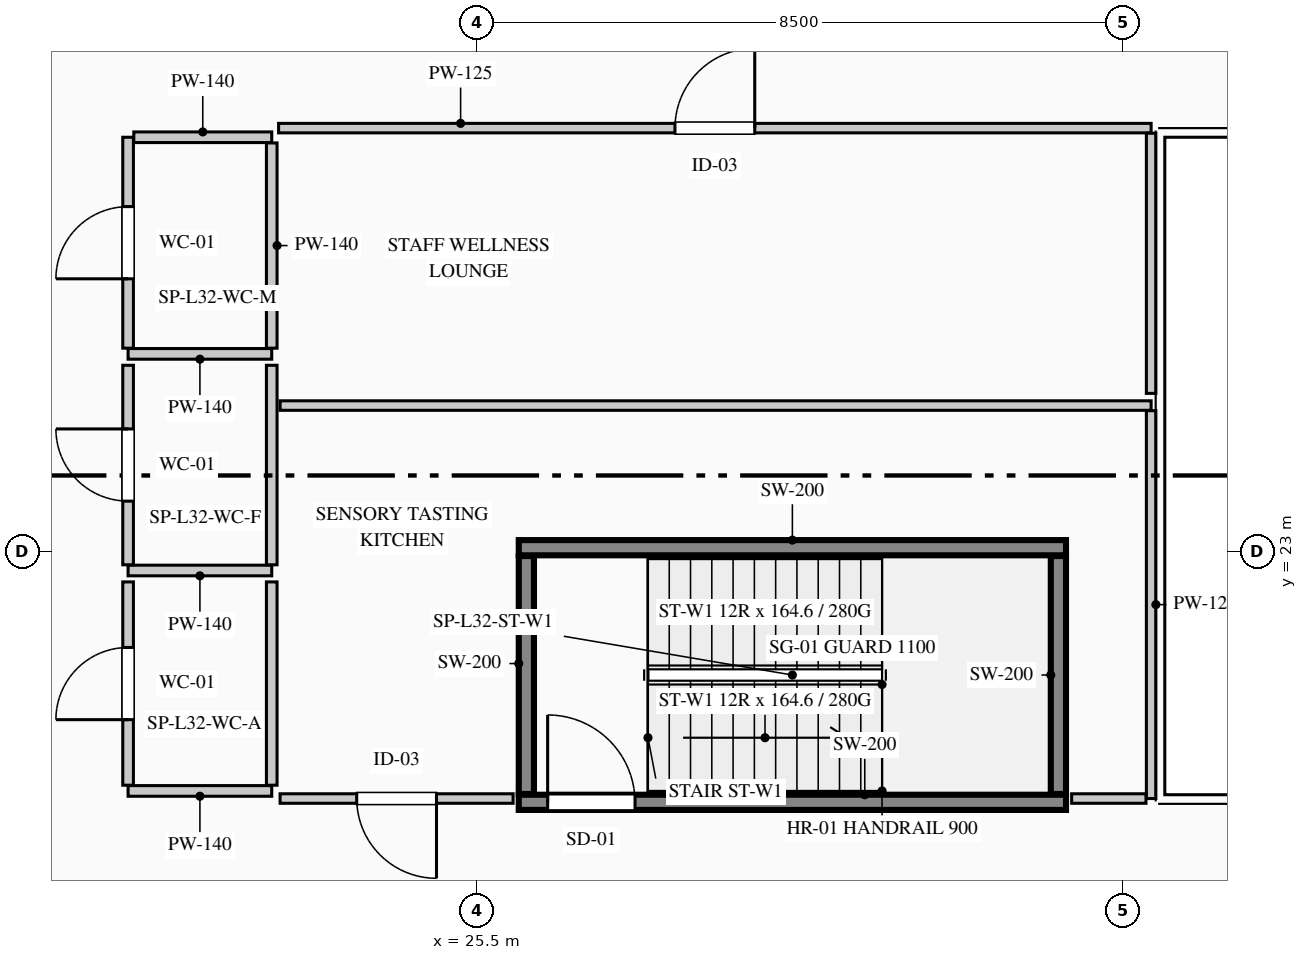
"""IFC4 building model, lengths in metres.
Left out: names, types, materials, properties, quantities, classifications, styles, units other than length and angle.
Written with IfcOpenShell. Run it as: python <this file> out.ifc"""

import sys

from ifc_helpers import new_model, si_unit, direction, frame, frame_2d, origin, place, context, subcontext, project, spatial, rectangle, extrude, element, fill, save


model = new_model("IFC4")
c1 = context("Model", 3, precision=1e-05, world=origin(), true_north=direction((0.0, 1.0)))
c2 = subcontext(c1, "Body", "Model", "MODEL_VIEW")
j1 = project(units=[si_unit("LENGTHUNIT", "METRE"), si_unit("PLANEANGLEUNIT", "RADIAN")], contexts=[c1])
p1 = place(None, origin())
s1 = spatial("IfcSite", under=j1, at=p1, CompositionType="ELEMENT")
p2 = place(p1, origin())
s2 = spatial("IfcBuilding", under=s1, at=p2, CompositionType="ELEMENT")
p3 = place(p2, frame((0.0, 0.0, 139.05)))
s3 = spatial("IfcBuildingStorey", under=s2, at=p3, CompositionType="ELEMENT", Elevation=139.05)
p4 = place(p3, frame((26.05, 19.7, 0.0), z_axis=(0.0, 0.0, 1.0), x_axis=(1.0, 0.0, 0.0)))
e1 = element("IfcWall", 1, at=p4, inside=s3, PredefinedType="SHEAR", context=c2, shape_type="SweptSolid", body=[
    extrude(rectangle(XDim=7.2, YDim=0.2, at=frame_2d((3.6, 0.0))), origin(), (0.0, 0.0, 1.0), 3.95),
])
p5 = place(p4, frame((0.38, 0.0, 0.0)))
e2 = element("IfcOpeningElement", 2, at=p5, cuts=e1, PredefinedType="OPENING", context=c2, shape_type="SweptSolid", body=[
    extrude(rectangle(XDim=1.15, YDim=2.2, at=frame_2d((0.575, 1.1))), frame((0.0, 0.11, 0.0), z_axis=(0.0, -1.0, 0.0), x_axis=(1.0, 0.0, 0.0)), (0.0, 0.0, 1.0), 0.22),
])
p6 = place(p3, frame((26.05, 23.05, 0.0), z_axis=(0.0, 0.0, 1.0), x_axis=(1.0, 0.0, 0.0)))
e3 = element("IfcWall", 3, at=p6, inside=s3, PredefinedType="SHEAR", context=c2, shape_type="SweptSolid", body=[
    extrude(rectangle(XDim=7.2, YDim=0.2, at=frame_2d((3.6, 0.0))), origin(), (0.0, 0.0, 1.0), 3.95),
])
for number, where, z_axis, x_axis in (
    (4, (26.15, 19.81, 0.0), (0.0, 0.0, 1.0), (0.0, 1.0, 0.0)),
    (5, (33.15, 19.81, 0.0), (0.0, 0.0, 1.0), (0.0, 1.0, 0.0)),
):
    element("IfcWall", number, at=place(p3, frame(where, z_axis=z_axis, x_axis=x_axis)), inside=s3, PredefinedType="SHEAR", context=c2, shape_type="SweptSolid", body=[
        extrude(rectangle(XDim=3.13, YDim=0.2, at=frame_2d((1.565, 0.0))), origin(), (0.0, 0.0, 1.0), 3.95),
    ])
p7 = place(p3, frame((22.8, 25.6, 0.0), z_axis=(0.0, 0.0, 1.0), x_axis=(-1.0, 0.0, 0.0)))
e6 = element("IfcWall", 6, at=p7, inside=s3, PredefinedType="PARTITIONING", context=c2, shape_type="SweptSolid", body=[
    extrude(rectangle(XDim=1.89, YDim=0.14, at=frame_2d((0.945, 0.0))), origin(), (0.0, 0.0, 1.0), 3.69),
])
p8 = place(p3, frame((20.91, 25.675, 0.0), z_axis=(0.0, 0.0, 1.0), x_axis=(0.0, 1.0, 0.0)))
e7 = element("IfcWall", 7, at=p8, inside=s3, PredefinedType="PARTITIONING", context=c2, shape_type="SweptSolid", body=[
    extrude(rectangle(XDim=2.775, YDim=0.14, at=frame_2d((1.387, 0.0))), origin(), (0.0, 0.0, 1.0), 3.69),
])
p9 = place(p8, frame((0.913, 0.0, 0.0)))
e8 = element("IfcOpeningElement", 8, at=p9, cuts=e7, PredefinedType="OPENING", context=c2, shape_type="SweptSolid", body=[
    extrude(rectangle(XDim=0.95, YDim=2.15, at=frame_2d((0.475, 1.075))), frame((0.0, 0.08, 0.0), z_axis=(0.0, -1.0, 0.0), x_axis=(1.0, 0.0, 0.0)), (0.0, 0.0, 1.0), 0.16),
])
p10 = place(p3, frame((20.985, 28.45, 0.0), z_axis=(0.0, 0.0, 1.0), x_axis=(1.0, 0.0, 0.0)))
e9 = element("IfcWall", 9, at=p10, inside=s3, PredefinedType="PARTITIONING", context=c2, shape_type="SweptSolid", body=[
    extrude(rectangle(XDim=1.815, YDim=0.14, at=frame_2d((0.907, 0.0))), origin(), (0.0, 0.0, 1.0), 3.69),
])
p11 = place(p3, frame((22.8, 28.375, 0.0), z_axis=(0.0, 0.0, 1.0), x_axis=(0.0, -1.0, 0.0)))
e10 = element("IfcWall", 10, at=p11, inside=s3, PredefinedType="PARTITIONING", context=c2, shape_type="SweptSolid", body=[
    extrude(rectangle(XDim=2.7, YDim=0.14, at=frame_2d((1.35, 0.0))), origin(), (0.0, 0.0, 1.0), 3.275),
])
p12 = place(p3, frame((22.8, 22.75, 0.0), z_axis=(0.0, 0.0, 1.0), x_axis=(-1.0, 0.0, 0.0)))
e11 = element("IfcWall", 11, at=p12, inside=s3, PredefinedType="PARTITIONING", context=c2, shape_type="SweptSolid", body=[
    extrude(rectangle(XDim=1.89, YDim=0.14, at=frame_2d((0.945, 0.0))), origin(), (0.0, 0.0, 1.0), 3.69),
])
p13 = place(p3, frame((20.91, 22.825, 0.0), z_axis=(0.0, 0.0, 1.0), x_axis=(0.0, 1.0, 0.0)))
e12 = element("IfcWall", 12, at=p13, inside=s3, PredefinedType="PARTITIONING", context=c2, shape_type="SweptSolid", body=[
    extrude(rectangle(XDim=2.625, YDim=0.14, at=frame_2d((1.312, 0.0))), origin(), (0.0, 0.0, 1.0), 3.69),
])
p14 = place(p13, frame((0.837, 0.0, 0.0)))
e13 = element("IfcOpeningElement", 13, at=p14, cuts=e12, PredefinedType="OPENING", context=c2, shape_type="SweptSolid", body=[
    extrude(rectangle(XDim=0.95, YDim=2.15, at=frame_2d((0.475, 1.075))), frame((0.0, 0.08, 0.0), z_axis=(0.0, -1.0, 0.0), x_axis=(1.0, 0.0, 0.0)), (0.0, 0.0, 1.0), 0.16),
])
p15 = place(p3, frame((22.8, 25.45, 0.0), z_axis=(0.0, 0.0, 1.0), x_axis=(0.0, -1.0, 0.0)))
e14 = element("IfcWall", 14, at=p15, inside=s3, PredefinedType="PARTITIONING", context=c2, shape_type="SweptSolid", body=[
    extrude(rectangle(XDim=2.625, YDim=0.14, at=frame_2d((1.312, 0.0))), origin(), (0.0, 0.0, 1.0), 3.275),
])
p16 = place(p3, frame((22.8, 19.85, 0.0), z_axis=(0.0, 0.0, 1.0), x_axis=(-1.0, 0.0, 0.0)))
e15 = element("IfcWall", 15, at=p16, inside=s3, PredefinedType="PARTITIONING", context=c2, shape_type="SweptSolid", body=[
    extrude(rectangle(XDim=1.89, YDim=0.14, at=frame_2d((0.945, 0.0))), origin(), (0.0, 0.0, 1.0), 3.69),
])
p17 = place(p3, frame((20.91, 19.925, 0.0), z_axis=(0.0, 0.0, 1.0), x_axis=(0.0, 1.0, 0.0)))
e16 = element("IfcWall", 16, at=p17, inside=s3, PredefinedType="PARTITIONING", context=c2, shape_type="SweptSolid", body=[
    extrude(rectangle(XDim=2.675, YDim=0.14, at=frame_2d((1.337, 0.0))), origin(), (0.0, 0.0, 1.0), 3.69),
])
p18 = place(p17, frame((0.863, 0.0, 0.0)))
e17 = element("IfcOpeningElement", 17, at=p18, cuts=e16, PredefinedType="OPENING", context=c2, shape_type="SweptSolid", body=[
    extrude(rectangle(XDim=0.95, YDim=2.15, at=frame_2d((0.475, 1.075))), frame((0.0, 0.08, 0.0), z_axis=(0.0, -1.0, 0.0), x_axis=(1.0, 0.0, 0.0)), (0.0, 0.0, 1.0), 0.16),
])
p19 = place(p3, frame((22.8, 22.6, 0.0), z_axis=(0.0, 0.0, 1.0), x_axis=(0.0, -1.0, 0.0)))
e18 = element("IfcWall", 18, at=p19, inside=s3, PredefinedType="PARTITIONING", context=c2, shape_type="SweptSolid", body=[
    extrude(rectangle(XDim=2.675, YDim=0.14, at=frame_2d((1.337, 0.0))), origin(), (0.0, 0.0, 1.0), 3.275),
])
p20 = place(p3, frame((25.976, 19.75, 0.0), z_axis=(0.0, 0.0, 1.0), x_axis=(-1.0, 0.0, 0.0)))
e19 = element("IfcWall", 19, at=p20, inside=s3, PredefinedType="PARTITIONING", context=c2, shape_type="SweptSolid", body=[
    extrude(rectangle(XDim=3.066, YDim=0.125, at=frame_2d((1.533, 0.0))), origin(), (0.0, 0.0, 1.0), 3.69),
])
p21 = place(p20, frame((1.008, 0.0, 0.0)))
e20 = element("IfcOpeningElement", 20, at=p21, cuts=e19, PredefinedType="OPENING", context=c2, shape_type="SweptSolid", body=[
    extrude(rectangle(XDim=1.05, YDim=2.15, at=frame_2d((0.525, 1.075))), frame((0.0, 0.073, 0.0), z_axis=(0.0, -1.0, 0.0), x_axis=(1.0, 0.0, 0.0)), (0.0, 0.0, 1.0), 0.145),
])
p22 = place(p3, frame((22.91, 24.92, 0.0), z_axis=(0.0, 0.0, 1.0), x_axis=(1.0, 0.0, 0.0)))
e21 = element("IfcWall", 21, at=p22, inside=s3, PredefinedType="PARTITIONING", context=c2, shape_type="SweptSolid", body=[
    extrude(rectangle(XDim=11.46, YDim=0.125, at=frame_2d((5.73, 0.0))), origin(), (0.0, 0.0, 1.0), 3.275),
])
p23 = place(p3, frame((34.37, 24.853, 0.0), z_axis=(0.0, 0.0, 1.0), x_axis=(0.0, -1.0, 0.0)))
e22 = element("IfcWall", 22, at=p23, inside=s3, PredefinedType="PARTITIONING", context=c2, shape_type="SweptSolid", body=[
    extrude(rectangle(XDim=5.103, YDim=0.125, at=frame_2d((2.551, 0.0))), origin(), (0.0, 0.0, 1.0), 3.69),
])
p24 = place(p3, frame((34.302, 19.75, 0.0), z_axis=(0.0, 0.0, 1.0), x_axis=(-1.0, 0.0, 0.0)))
e23 = element("IfcWall", 23, at=p24, inside=s3, PredefinedType="PARTITIONING", context=c2, shape_type="SweptSolid", body=[
    extrude(rectangle(XDim=0.978, YDim=0.125, at=frame_2d((0.489, 0.0))), origin(), (0.0, 0.0, 1.0), 3.69),
])
p25 = place(p3, frame((22.89, 28.57, 0.0), z_axis=(0.0, 0.0, 1.0), x_axis=(1.0, 0.0, 0.0)))
e24 = element("IfcWall", 24, at=p25, inside=s3, PredefinedType="PARTITIONING", context=c2, shape_type="SweptSolid", body=[
    extrude(rectangle(XDim=11.48, YDim=0.125, at=frame_2d((5.74, 0.0))), origin(), (0.0, 0.0, 1.0), 3.275),
])
p26 = place(p25, frame((5.215, 0.0, 0.0)))
e25 = element("IfcOpeningElement", 25, at=p26, cuts=e24, PredefinedType="OPENING", context=c2, shape_type="SweptSolid", body=[
    extrude(rectangle(XDim=1.05, YDim=2.15, at=frame_2d((0.525, 1.075))), frame((0.0, 0.073, 0.0), z_axis=(0.0, -1.0, 0.0), x_axis=(1.0, 0.0, 0.0)), (0.0, 0.0, 1.0), 0.145),
])
p27 = place(p3, frame((34.37, 28.502, 0.0), z_axis=(0.0, 0.0, 1.0), x_axis=(0.0, -1.0, 0.0)))
e26 = element("IfcWall", 26, at=p27, inside=s3, PredefinedType="PARTITIONING", context=c2, shape_type="SweptSolid", body=[
    extrude(rectangle(XDim=3.422, YDim=0.125, at=frame_2d((1.711, 0.0))), origin(), (0.0, 0.0, 1.0), 3.69),
])
p28 = place(p5, origin())
e27 = element("IfcDoor", 27, at=p28, inside=s3, OperationType="SINGLE_SWING_LEFT", PredefinedType="DOOR", context=c2, shape_type="SweptSolid", body=[
    extrude(rectangle(XDim=1.15, YDim=2.2, at=frame_2d((0.575, 1.1))), frame((0.0, 0.025, 0.0), z_axis=(0.0, -1.0, 0.0), x_axis=(1.0, 0.0, 0.0)), (0.0, 0.0, 1.0), 0.05),
])
fill(e2, e27)
p29 = place(p9, origin())
e28 = element("IfcDoor", 28, at=p29, inside=s3, OperationType="SINGLE_SWING_LEFT", PredefinedType="DOOR", context=c2, shape_type="SweptSolid", body=[
    extrude(rectangle(XDim=0.95, YDim=2.15, at=frame_2d((0.475, 1.075))), frame((0.0, 0.025, 0.0), z_axis=(0.0, -1.0, 0.0), x_axis=(1.0, 0.0, 0.0)), (0.0, 0.0, 1.0), 0.05),
])
fill(e8, e28)
p30 = place(p14, origin())
e29 = element("IfcDoor", 29, at=p30, inside=s3, OperationType="SINGLE_SWING_RIGHT", PredefinedType="DOOR", context=c2, shape_type="SweptSolid", body=[
    extrude(rectangle(XDim=0.95, YDim=2.15, at=frame_2d((0.475, 1.075))), frame((0.0, 0.025, 0.0), z_axis=(0.0, -1.0, 0.0), x_axis=(1.0, 0.0, 0.0)), (0.0, 0.0, 1.0), 0.05),
])
fill(e13, e29)
p31 = place(p18, origin())
e30 = element("IfcDoor", 30, at=p31, inside=s3, OperationType="SINGLE_SWING_LEFT", PredefinedType="DOOR", context=c2, shape_type="SweptSolid", body=[
    extrude(rectangle(XDim=0.95, YDim=2.15, at=frame_2d((0.475, 1.075))), frame((0.0, 0.025, 0.0), z_axis=(0.0, -1.0, 0.0), x_axis=(1.0, 0.0, 0.0)), (0.0, 0.0, 1.0), 0.05),
])
fill(e17, e30)
p32 = place(p21, origin())
e31 = element("IfcDoor", 31, at=p32, inside=s3, OperationType="SINGLE_SWING_LEFT", PredefinedType="DOOR", context=c2, shape_type="SweptSolid", body=[
    extrude(rectangle(XDim=1.05, YDim=2.15, at=frame_2d((0.525, 1.075))), frame((0.0, 0.025, 0.0), z_axis=(0.0, -1.0, 0.0), x_axis=(1.0, 0.0, 0.0)), (0.0, 0.0, 1.0), 0.05),
])
fill(e20, e31)
p33 = place(p26, origin())
e32 = element("IfcDoor", 32, at=p33, inside=s3, OperationType="SINGLE_SWING_RIGHT", PredefinedType="DOOR", context=c2, shape_type="SweptSolid", body=[
    extrude(rectangle(XDim=1.05, YDim=2.15, at=frame_2d((0.525, 1.075))), frame((0.0, 0.025, 0.0), z_axis=(0.0, -1.0, 0.0), x_axis=(1.0, 0.0, 0.0)), (0.0, 0.0, 1.0), 0.05),
])
fill(e25, e32)
save(model, sys.argv[1])
